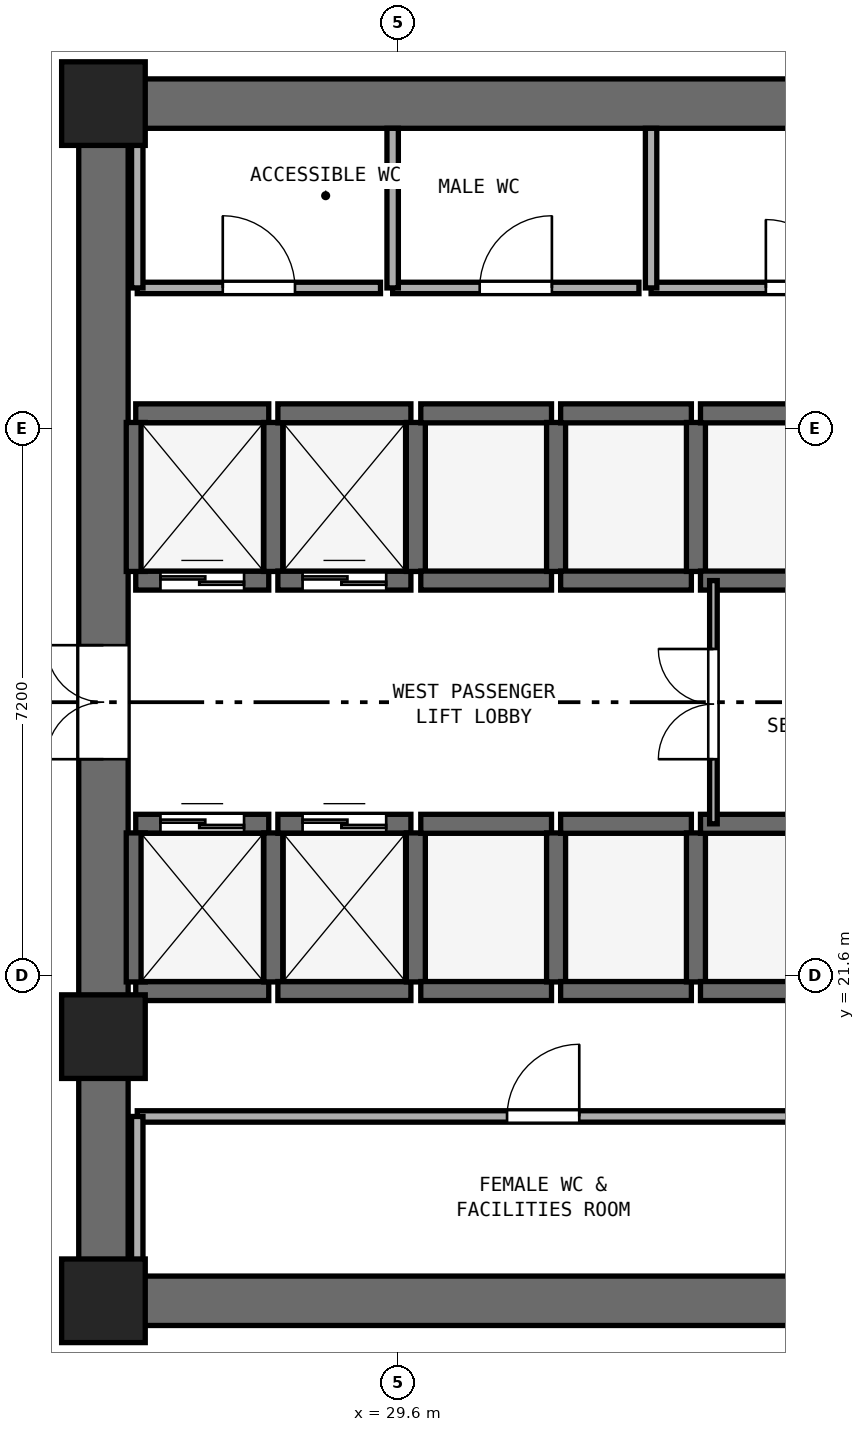
"""IFC4 building model, lengths in metres.
Left out: names, types, materials, properties, quantities, classifications, styles, units other than length and angle.
Written with IfcOpenShell. Run it as: python <this file> out.ifc"""

import sys

from ifc_helpers import new_model, si_unit, direction, frame, frame_2d, origin, origin_2d, place, context, subcontext, project, spatial, rectangle, extrude, element, fill, save


model = new_model("IFC4")
c1 = context("Model", 3, precision=1e-05, world=origin(), true_north=direction((0.0, 1.0)))
c2 = subcontext(c1, "Body", "Model", "MODEL_VIEW")
j1 = project(units=[si_unit("LENGTHUNIT", "METRE"), si_unit("PLANEANGLEUNIT", "RADIAN")], contexts=[c1])
p1 = place(None, origin())
s1 = spatial("IfcSite", under=j1, at=p1, CompositionType="ELEMENT")
p2 = place(p1, origin())
s2 = spatial("IfcBuilding", under=s1, at=p2, CompositionType="ELEMENT")
p3 = place(p2, frame((0.0, 0.0, 93.4)))
s3 = spatial("IfcBuildingStorey", under=s2, at=p3, CompositionType="ELEMENT", Elevation=93.4)
for number, where, z_axis, x_axis in (
    (1, (25.4, 17.325, 0.0), (0.0, 0.0, 1.0), (1.0, 0.0, 0.0)),
    (2, (25.4, 33.075, 0.0), (0.0, 0.0, 1.0), (1.0, 0.0, 0.0)),
):
    element("IfcWall", number, at=place(p3, frame(where, z_axis=z_axis, x_axis=x_axis)), inside=s3, PredefinedType="SHEAR", context=c2, shape_type="SweptSolid", body=[
        extrude(rectangle(XDim=23.2, YDim=0.65, at=frame_2d((11.6, 0.0))), origin(), (0.0, 0.0, 1.0), 3.525),
    ])
p4 = place(p3, frame((25.725, 17.65, 0.0), z_axis=(0.0, 0.0, 1.0), x_axis=(0.0, 1.0, 0.0)))
e3 = element("IfcWall", 3, at=p4, inside=s3, PredefinedType="SHEAR", context=c2, shape_type="SweptSolid", body=[
    extrude(rectangle(XDim=15.1, YDim=0.65, at=frame_2d((7.55, 0.0))), origin(), (0.0, 0.0, 1.0), 3.525),
])
p5 = place(p4, frame((6.8, 0.0, 0.0)))
e4 = element("IfcOpeningElement", 4, at=p5, cuts=e3, PredefinedType="OPENING", context=c2, shape_type="SweptSolid", body=[
    extrude(rectangle(XDim=1.5, YDim=2.15, at=frame_2d((0.75, 1.075))), frame((0.0, 0.335, 0.0), z_axis=(0.0, -1.0, 0.0), x_axis=(1.0, 0.0, 0.0)), (0.0, 0.0, 1.0), 0.67),
])
for number, where, z_axis, x_axis in (
    (5, (25.725, 17.325, 0.0), (0.0, 0.0, 1.0), (1.0, 0.0, 0.0)),
    (6, (25.725, 33.075, 0.0), (0.0, 0.0, 1.0), (1.0, 0.0, 0.0)),
    (7, (25.725, 20.8, 0.0), (0.0, 0.0, 1.0), (1.0, 0.0, 0.0)),
):
    element("IfcColumn", number, at=place(p3, frame(where, z_axis=z_axis, x_axis=x_axis)), inside=s3, PredefinedType="PILASTER", context=c2, shape_type="SweptSolid", body=[
        extrude(rectangle(XDim=1.1, YDim=1.1, at=origin_2d()), origin(), (0.0, 0.0, 1.0), 3.8),
    ])
p6 = place(p3, frame((26.15, 26.8, 0.0), z_axis=(0.0, 0.0, 1.0), x_axis=(1.0, 0.0, 0.0)))
e8 = element("IfcWall", 8, at=p6, inside=s3, PredefinedType="SHEAR", context=c2, shape_type="SweptSolid", body=[
    extrude(rectangle(XDim=1.75, YDim=0.25, at=frame_2d((0.875, 0.0))), origin(), (0.0, 0.0, 1.0), 3.525),
])
p7 = place(p6, frame((0.325, 0.0, 0.0)))
e9 = element("IfcOpeningElement", 9, at=p7, cuts=e8, PredefinedType="OPENING", context=c2, shape_type="SweptSolid", body=[
    extrude(rectangle(XDim=1.1, YDim=2.15, at=frame_2d((0.55, 1.075))), frame((0.0, 0.135, 0.0), z_axis=(0.0, -1.0, 0.0), x_axis=(1.0, 0.0, 0.0)), (0.0, 0.0, 1.0), 0.27),
])
p8 = place(p3, frame((26.15, 29.0, 0.0), z_axis=(0.0, 0.0, 1.0), x_axis=(1.0, 0.0, 0.0)))
e10 = element("IfcWall", 10, at=p8, inside=s3, PredefinedType="SHEAR", context=c2, shape_type="SweptSolid", body=[
    extrude(rectangle(XDim=1.75, YDim=0.25, at=frame_2d((0.875, 0.0))), origin(), (0.0, 0.0, 1.0), 3.525),
])
for number, where, z_axis, x_axis in (
    (11, (26.15, 26.92, 0.0), (0.0, 0.0, 1.0), (0.0, 1.0, 0.0)),
    (12, (27.96, 26.92, 0.0), (0.0, 0.0, 1.0), (0.0, 1.0, 0.0)),
):
    element("IfcWall", number, at=place(p3, frame(where, z_axis=z_axis, x_axis=x_axis)), inside=s3, PredefinedType="SHEAR", context=c2, shape_type="SweptSolid", body=[
        extrude(rectangle(XDim=1.96, YDim=0.25, at=frame_2d((0.98, 0.0))), origin(), (0.0, 0.0, 1.0), 3.525),
    ])
p9 = place(p3, frame((28.02, 26.8, 0.0), z_axis=(0.0, 0.0, 1.0), x_axis=(1.0, 0.0, 0.0)))
e13 = element("IfcWall", 13, at=p9, inside=s3, PredefinedType="SHEAR", context=c2, shape_type="SweptSolid", body=[
    extrude(rectangle(XDim=1.75, YDim=0.25, at=frame_2d((0.875, 0.0))), origin(), (0.0, 0.0, 1.0), 3.525),
])
p10 = place(p9, frame((0.325, 0.0, 0.0)))
e14 = element("IfcOpeningElement", 14, at=p10, cuts=e13, PredefinedType="OPENING", context=c2, shape_type="SweptSolid", body=[
    extrude(rectangle(XDim=1.1, YDim=2.15, at=frame_2d((0.55, 1.075))), frame((0.0, 0.135, 0.0), z_axis=(0.0, -1.0, 0.0), x_axis=(1.0, 0.0, 0.0)), (0.0, 0.0, 1.0), 0.27),
])
p11 = place(p3, frame((28.02, 29.0, 0.0), z_axis=(0.0, 0.0, 1.0), x_axis=(1.0, 0.0, 0.0)))
e15 = element("IfcWall", 15, at=p11, inside=s3, PredefinedType="SHEAR", context=c2, shape_type="SweptSolid", body=[
    extrude(rectangle(XDim=1.75, YDim=0.25, at=frame_2d((0.875, 0.0))), origin(), (0.0, 0.0, 1.0), 3.525),
])
p12 = place(p3, frame((29.835, 26.92, 0.0), z_axis=(0.0, 0.0, 1.0), x_axis=(0.0, 1.0, 0.0)))
e16 = element("IfcWall", 16, at=p12, inside=s3, PredefinedType="SHEAR", context=c2, shape_type="SweptSolid", body=[
    extrude(rectangle(XDim=1.96, YDim=0.25, at=frame_2d((0.98, 0.0))), origin(), (0.0, 0.0, 1.0), 3.525),
])
p13 = place(p3, frame((26.15, 21.4, 0.0), z_axis=(0.0, 0.0, 1.0), x_axis=(1.0, 0.0, 0.0)))
e17 = element("IfcWall", 17, at=p13, inside=s3, PredefinedType="SHEAR", context=c2, shape_type="SweptSolid", body=[
    extrude(rectangle(XDim=1.75, YDim=0.25, at=frame_2d((0.875, 0.0))), origin(), (0.0, 0.0, 1.0), 3.525),
])
p14 = place(p3, frame((26.15, 23.6, 0.0), z_axis=(0.0, 0.0, 1.0), x_axis=(1.0, 0.0, 0.0)))
e18 = element("IfcWall", 18, at=p14, inside=s3, PredefinedType="SHEAR", context=c2, shape_type="SweptSolid", body=[
    extrude(rectangle(XDim=1.75, YDim=0.25, at=frame_2d((0.875, 0.0))), origin(), (0.0, 0.0, 1.0), 3.525),
])
p15 = place(p14, frame((0.325, 0.0, 0.0)))
e19 = element("IfcOpeningElement", 19, at=p15, cuts=e18, PredefinedType="OPENING", context=c2, shape_type="SweptSolid", body=[
    extrude(rectangle(XDim=1.1, YDim=2.15, at=frame_2d((0.55, 1.075))), frame((0.0, 0.135, 0.0), z_axis=(0.0, -1.0, 0.0), x_axis=(1.0, 0.0, 0.0)), (0.0, 0.0, 1.0), 0.27),
])
for number, where, z_axis, x_axis in (
    (20, (26.15, 21.52, 0.0), (0.0, 0.0, 1.0), (0.0, 1.0, 0.0)),
    (21, (27.96, 21.52, 0.0), (0.0, 0.0, 1.0), (0.0, 1.0, 0.0)),
):
    element("IfcWall", number, at=place(p3, frame(where, z_axis=z_axis, x_axis=x_axis)), inside=s3, PredefinedType="SHEAR", context=c2, shape_type="SweptSolid", body=[
        extrude(rectangle(XDim=1.96, YDim=0.25, at=frame_2d((0.98, 0.0))), origin(), (0.0, 0.0, 1.0), 3.525),
    ])
p16 = place(p3, frame((28.02, 21.4, 0.0), z_axis=(0.0, 0.0, 1.0), x_axis=(1.0, 0.0, 0.0)))
e22 = element("IfcWall", 22, at=p16, inside=s3, PredefinedType="SHEAR", context=c2, shape_type="SweptSolid", body=[
    extrude(rectangle(XDim=1.75, YDim=0.25, at=frame_2d((0.875, 0.0))), origin(), (0.0, 0.0, 1.0), 3.525),
])
p17 = place(p3, frame((28.02, 23.6, 0.0), z_axis=(0.0, 0.0, 1.0), x_axis=(1.0, 0.0, 0.0)))
e23 = element("IfcWall", 23, at=p17, inside=s3, PredefinedType="SHEAR", context=c2, shape_type="SweptSolid", body=[
    extrude(rectangle(XDim=1.75, YDim=0.25, at=frame_2d((0.875, 0.0))), origin(), (0.0, 0.0, 1.0), 3.525),
])
p18 = place(p17, frame((0.325, 0.0, 0.0)))
e24 = element("IfcOpeningElement", 24, at=p18, cuts=e23, PredefinedType="OPENING", context=c2, shape_type="SweptSolid", body=[
    extrude(rectangle(XDim=1.1, YDim=2.15, at=frame_2d((0.55, 1.075))), frame((0.0, 0.135, 0.0), z_axis=(0.0, -1.0, 0.0), x_axis=(1.0, 0.0, 0.0)), (0.0, 0.0, 1.0), 0.27),
])
p19 = place(p3, frame((29.835, 21.52, 0.0), z_axis=(0.0, 0.0, 1.0), x_axis=(0.0, 1.0, 0.0)))
e25 = element("IfcWall", 25, at=p19, inside=s3, PredefinedType="SHEAR", context=c2, shape_type="SweptSolid", body=[
    extrude(rectangle(XDim=1.96, YDim=0.25, at=frame_2d((0.98, 0.0))), origin(), (0.0, 0.0, 1.0), 3.525),
])
for number, where, z_axis, x_axis in (
    (26, (29.9, 21.4, 0.0), (0.0, 0.0, 1.0), (1.0, 0.0, 0.0)),
    (27, (29.9, 23.6, 0.0), (0.0, 0.0, 1.0), (1.0, 0.0, 0.0)),
):
    element("IfcWall", number, at=place(p3, frame(where, z_axis=z_axis, x_axis=x_axis)), inside=s3, PredefinedType="SHEAR", context=c2, shape_type="SweptSolid", body=[
        extrude(rectangle(XDim=1.72, YDim=0.25, at=frame_2d((0.86, 0.0))), origin(), (0.0, 0.0, 1.0), 3.525),
    ])
p20 = place(p3, frame((31.68, 21.52, 0.0), z_axis=(0.0, 0.0, 1.0), x_axis=(0.0, 1.0, 0.0)))
e28 = element("IfcWall", 28, at=p20, inside=s3, PredefinedType="SHEAR", context=c2, shape_type="SweptSolid", body=[
    extrude(rectangle(XDim=1.96, YDim=0.25, at=frame_2d((0.98, 0.0))), origin(), (0.0, 0.0, 1.0), 3.525),
])
for number, where, z_axis, x_axis in (
    (29, (31.74, 21.4, 0.0), (0.0, 0.0, 1.0), (1.0, 0.0, 0.0)),
    (30, (31.74, 23.6, 0.0), (0.0, 0.0, 1.0), (1.0, 0.0, 0.0)),
):
    element("IfcWall", number, at=place(p3, frame(where, z_axis=z_axis, x_axis=x_axis)), inside=s3, PredefinedType="SHEAR", context=c2, shape_type="SweptSolid", body=[
        extrude(rectangle(XDim=1.72, YDim=0.25, at=frame_2d((0.86, 0.0))), origin(), (0.0, 0.0, 1.0), 3.525),
    ])
p21 = place(p3, frame((33.52, 21.52, 0.0), z_axis=(0.0, 0.0, 1.0), x_axis=(0.0, 1.0, 0.0)))
e31 = element("IfcWall", 31, at=p21, inside=s3, PredefinedType="SHEAR", context=c2, shape_type="SweptSolid", body=[
    extrude(rectangle(XDim=1.96, YDim=0.25, at=frame_2d((0.98, 0.0))), origin(), (0.0, 0.0, 1.0), 3.525),
])
for number, where, z_axis, x_axis in (
    (32, (33.58, 21.4, 0.0), (0.0, 0.0, 1.0), (1.0, 0.0, 0.0)),
    (33, (33.58, 23.6, 0.0), (0.0, 0.0, 1.0), (1.0, 0.0, 0.0)),
):
    element("IfcWall", number, at=place(p3, frame(where, z_axis=z_axis, x_axis=x_axis)), inside=s3, PredefinedType="SHEAR", context=c2, shape_type="SweptSolid", body=[
        extrude(rectangle(XDim=1.72, YDim=0.25, at=frame_2d((0.86, 0.0))), origin(), (0.0, 0.0, 1.0), 3.525),
    ])
for number, where, z_axis, x_axis in (
    (34, (29.9, 26.8, 0.0), (0.0, 0.0, 1.0), (1.0, 0.0, 0.0)),
    (35, (29.9, 29.0, 0.0), (0.0, 0.0, 1.0), (1.0, 0.0, 0.0)),
):
    element("IfcWall", number, at=place(p3, frame(where, z_axis=z_axis, x_axis=x_axis)), inside=s3, PredefinedType="SHEAR", context=c2, shape_type="SweptSolid", body=[
        extrude(rectangle(XDim=1.72, YDim=0.25, at=frame_2d((0.86, 0.0))), origin(), (0.0, 0.0, 1.0), 3.525),
    ])
p22 = place(p3, frame((31.68, 26.92, 0.0), z_axis=(0.0, 0.0, 1.0), x_axis=(0.0, 1.0, 0.0)))
e36 = element("IfcWall", 36, at=p22, inside=s3, PredefinedType="SHEAR", context=c2, shape_type="SweptSolid", body=[
    extrude(rectangle(XDim=1.96, YDim=0.25, at=frame_2d((0.98, 0.0))), origin(), (0.0, 0.0, 1.0), 3.525),
])
for number, where, z_axis, x_axis in (
    (37, (31.74, 26.8, 0.0), (0.0, 0.0, 1.0), (1.0, 0.0, 0.0)),
    (38, (31.74, 29.0, 0.0), (0.0, 0.0, 1.0), (1.0, 0.0, 0.0)),
):
    element("IfcWall", number, at=place(p3, frame(where, z_axis=z_axis, x_axis=x_axis)), inside=s3, PredefinedType="SHEAR", context=c2, shape_type="SweptSolid", body=[
        extrude(rectangle(XDim=1.72, YDim=0.25, at=frame_2d((0.86, 0.0))), origin(), (0.0, 0.0, 1.0), 3.525),
    ])
p23 = place(p3, frame((33.52, 26.92, 0.0), z_axis=(0.0, 0.0, 1.0), x_axis=(0.0, 1.0, 0.0)))
e39 = element("IfcWall", 39, at=p23, inside=s3, PredefinedType="SHEAR", context=c2, shape_type="SweptSolid", body=[
    extrude(rectangle(XDim=1.96, YDim=0.25, at=frame_2d((0.98, 0.0))), origin(), (0.0, 0.0, 1.0), 3.525),
])
for number, where, z_axis, x_axis in (
    (40, (33.58, 26.8, 0.0), (0.0, 0.0, 1.0), (1.0, 0.0, 0.0)),
    (41, (33.58, 29.0, 0.0), (0.0, 0.0, 1.0), (1.0, 0.0, 0.0)),
):
    element("IfcWall", number, at=place(p3, frame(where, z_axis=z_axis, x_axis=x_axis)), inside=s3, PredefinedType="SHEAR", context=c2, shape_type="SweptSolid", body=[
        extrude(rectangle(XDim=1.72, YDim=0.25, at=frame_2d((0.86, 0.0))), origin(), (0.0, 0.0, 1.0), 3.525),
    ])
p24 = place(p3, frame((26.17, 30.65, 0.0), z_axis=(0.0, 0.0, 1.0), x_axis=(1.0, 0.0, 0.0)))
e42 = element("IfcWall", 42, at=p24, inside=s3, PredefinedType="PARTITIONING", context=c2, shape_type="SweptSolid", body=[
    extrude(rectangle(XDim=3.2, YDim=0.15, at=frame_2d((1.6, 0.0))), origin(), (0.0, 0.0, 1.0), 3.525),
])
p25 = place(p24, frame((1.125, 0.0, 0.0)))
e43 = element("IfcOpeningElement", 43, at=p25, cuts=e42, PredefinedType="OPENING", context=c2, shape_type="SweptSolid", body=[
    extrude(rectangle(XDim=0.95, YDim=2.1, at=frame_2d((0.475, 1.05))), frame((0.0, 0.085, 0.0), z_axis=(0.0, -1.0, 0.0), x_axis=(1.0, 0.0, 0.0)), (0.0, 0.0, 1.0), 0.17),
])
p26 = place(p3, frame((26.17, 30.65, 0.0), z_axis=(0.0, 0.0, 1.0), x_axis=(0.0, 1.0, 0.0)))
e44 = element("IfcWall", 44, at=p26, inside=s3, PredefinedType="PARTITIONING", context=c2, shape_type="SweptSolid", body=[
    extrude(rectangle(XDim=2.1, YDim=0.15, at=frame_2d((1.05, 0.0))), origin(), (0.0, 0.0, 1.0), 3.525),
])
p27 = place(p3, frame((29.53, 30.65, 0.0), z_axis=(0.0, 0.0, 1.0), x_axis=(1.0, 0.0, 0.0)))
e45 = element("IfcWall", 45, at=p27, inside=s3, PredefinedType="PARTITIONING", context=c2, shape_type="SweptSolid", body=[
    extrude(rectangle(XDim=3.24, YDim=0.15, at=frame_2d((1.62, 0.0))), origin(), (0.0, 0.0, 1.0), 3.525),
])
p28 = place(p27, frame((1.145, 0.0, 0.0)))
e46 = element("IfcOpeningElement", 46, at=p28, cuts=e45, PredefinedType="OPENING", context=c2, shape_type="SweptSolid", body=[
    extrude(rectangle(XDim=0.95, YDim=2.1, at=frame_2d((0.475, 1.05))), frame((0.0, 0.085, 0.0), z_axis=(0.0, -1.0, 0.0), x_axis=(1.0, 0.0, 0.0)), (0.0, 0.0, 1.0), 0.17),
])
p29 = place(p3, frame((29.53, 30.65, 0.0), z_axis=(0.0, 0.0, 1.0), x_axis=(0.0, 1.0, 0.0)))
e47 = element("IfcWall", 47, at=p29, inside=s3, PredefinedType="PARTITIONING", context=c2, shape_type="SweptSolid", body=[
    extrude(rectangle(XDim=2.1, YDim=0.15, at=frame_2d((1.05, 0.0))), origin(), (0.0, 0.0, 1.0), 3.525),
])
p30 = place(p3, frame((32.93, 30.65, 0.0), z_axis=(0.0, 0.0, 1.0), x_axis=(1.0, 0.0, 0.0)))
e48 = element("IfcWall", 48, at=p30, inside=s3, PredefinedType="PARTITIONING", context=c2, shape_type="SweptSolid", body=[
    extrude(rectangle(XDim=3.92, YDim=0.15, at=frame_2d((1.96, 0.0))), origin(), (0.0, 0.0, 1.0), 3.525),
])
p31 = place(p30, frame((1.51, 0.0, 0.0)))
e49 = element("IfcOpeningElement", 49, at=p31, cuts=e48, PredefinedType="OPENING", context=c2, shape_type="SweptSolid", body=[
    extrude(rectangle(XDim=0.9, YDim=2.1, at=frame_2d((0.45, 1.05))), frame((0.0, 0.085, 0.0), z_axis=(0.0, -1.0, 0.0), x_axis=(1.0, 0.0, 0.0)), (0.0, 0.0, 1.0), 0.17),
])
p32 = place(p3, frame((32.93, 30.65, 0.0), z_axis=(0.0, 0.0, 1.0), x_axis=(0.0, 1.0, 0.0)))
e50 = element("IfcWall", 50, at=p32, inside=s3, PredefinedType="PARTITIONING", context=c2, shape_type="SweptSolid", body=[
    extrude(rectangle(XDim=2.1, YDim=0.15, at=frame_2d((1.05, 0.0))), origin(), (0.0, 0.0, 1.0), 3.525),
])
p33 = place(p3, frame((26.17, 19.75, 0.0), z_axis=(0.0, 0.0, 1.0), x_axis=(1.0, 0.0, 0.0)))
e51 = element("IfcWall", 51, at=p33, inside=s3, PredefinedType="PARTITIONING", context=c2, shape_type="SweptSolid", body=[
    extrude(rectangle(XDim=10.68, YDim=0.15, at=frame_2d((5.34, 0.0))), origin(), (0.0, 0.0, 1.0), 3.525),
])
p34 = place(p33, frame((4.865, 0.0, 0.0)))
e52 = element("IfcOpeningElement", 52, at=p34, cuts=e51, PredefinedType="OPENING", context=c2, shape_type="SweptSolid", body=[
    extrude(rectangle(XDim=0.95, YDim=2.1, at=frame_2d((0.475, 1.05))), frame((0.0, 0.085, 0.0), z_axis=(0.0, -1.0, 0.0), x_axis=(1.0, 0.0, 0.0)), (0.0, 0.0, 1.0), 0.17),
])
p35 = place(p3, frame((26.17, 17.65, 0.0), z_axis=(0.0, 0.0, 1.0), x_axis=(0.0, 1.0, 0.0)))
e53 = element("IfcWall", 53, at=p35, inside=s3, PredefinedType="PARTITIONING", context=c2, shape_type="SweptSolid", body=[
    extrude(rectangle(XDim=2.1, YDim=0.15, at=frame_2d((1.05, 0.0))), origin(), (0.0, 0.0, 1.0), 3.525),
])
p36 = place(p3, frame((33.75, 23.6, 0.0), z_axis=(0.0, 0.0, 1.0), x_axis=(0.0, 1.0, 0.0)))
e54 = element("IfcWall", 54, at=p36, inside=s3, PredefinedType="PARTITIONING", context=c2, shape_type="SweptSolid", body=[
    extrude(rectangle(XDim=3.2, YDim=0.1, at=frame_2d((1.6, 0.0))), origin(), (0.0, 0.0, 1.0), 3.525),
])
p37 = place(p36, frame((0.85, 0.0, 0.0)))
e55 = element("IfcOpeningElement", 55, at=p37, cuts=e54, PredefinedType="OPENING", context=c2, shape_type="SweptSolid", body=[
    extrude(rectangle(XDim=1.45, YDim=2.12, at=frame_2d((0.725, 1.06))), frame((0.0, 0.06, 0.0), z_axis=(0.0, -1.0, 0.0), x_axis=(1.0, 0.0, 0.0)), (0.0, 0.0, 1.0), 0.12),
])
p38 = place(p7, origin())
e56 = element("IfcDoor", 56, at=p38, inside=s3, OperationType="DOUBLE_DOOR_SLIDING", PredefinedType="DOOR", context=c2, shape_type="SweptSolid", body=[
    extrude(rectangle(XDim=1.1, YDim=2.15, at=frame_2d((0.55, 1.075))), frame((0.0, 0.025, 0.0), z_axis=(0.0, -1.0, 0.0), x_axis=(1.0, 0.0, 0.0)), (0.0, 0.0, 1.0), 0.05),
])
fill(e9, e56)
p39 = place(p10, origin())
e57 = element("IfcDoor", 57, at=p39, inside=s3, OperationType="DOUBLE_DOOR_SLIDING", PredefinedType="DOOR", context=c2, shape_type="SweptSolid", body=[
    extrude(rectangle(XDim=1.1, YDim=2.15, at=frame_2d((0.55, 1.075))), frame((0.0, 0.025, 0.0), z_axis=(0.0, -1.0, 0.0), x_axis=(1.0, 0.0, 0.0)), (0.0, 0.0, 1.0), 0.05),
])
fill(e14, e57)
p40 = place(p15, origin())
e58 = element("IfcDoor", 58, at=p40, inside=s3, OperationType="DOUBLE_DOOR_SLIDING", PredefinedType="DOOR", context=c2, shape_type="SweptSolid", body=[
    extrude(rectangle(XDim=1.1, YDim=2.15, at=frame_2d((0.55, 1.075))), frame((0.0, 0.025, 0.0), z_axis=(0.0, -1.0, 0.0), x_axis=(1.0, 0.0, 0.0)), (0.0, 0.0, 1.0), 0.05),
])
fill(e19, e58)
p41 = place(p18, origin())
e59 = element("IfcDoor", 59, at=p41, inside=s3, OperationType="DOUBLE_DOOR_SLIDING", PredefinedType="DOOR", context=c2, shape_type="SweptSolid", body=[
    extrude(rectangle(XDim=1.1, YDim=2.15, at=frame_2d((0.55, 1.075))), frame((0.0, 0.025, 0.0), z_axis=(0.0, -1.0, 0.0), x_axis=(1.0, 0.0, 0.0)), (0.0, 0.0, 1.0), 0.05),
])
fill(e24, e59)
p42 = place(p5, origin())
e60 = element("IfcDoor", 60, at=p42, inside=s3, OperationType="DOUBLE_DOOR_SINGLE_SWING", PredefinedType="DOOR", context=c2, shape_type="SweptSolid", body=[
    extrude(rectangle(XDim=1.5, YDim=2.15, at=frame_2d((0.75, 1.075))), frame((0.0, 0.025, 0.0), z_axis=(0.0, -1.0, 0.0), x_axis=(1.0, 0.0, 0.0)), (0.0, 0.0, 1.0), 0.05),
])
fill(e4, e60)
p43 = place(p25, origin())
e61 = element("IfcDoor", 61, at=p43, inside=s3, OperationType="SINGLE_SWING_LEFT", PredefinedType="DOOR", context=c2, shape_type="SweptSolid", body=[
    extrude(rectangle(XDim=0.95, YDim=2.1, at=frame_2d((0.475, 1.05))), frame((0.0, 0.025, 0.0), z_axis=(0.0, -1.0, 0.0), x_axis=(1.0, 0.0, 0.0)), (0.0, 0.0, 1.0), 0.05),
])
fill(e43, e61)
p44 = place(p28, origin())
e62 = element("IfcDoor", 62, at=p44, inside=s3, OperationType="SINGLE_SWING_RIGHT", PredefinedType="DOOR", context=c2, shape_type="SweptSolid", body=[
    extrude(rectangle(XDim=0.95, YDim=2.1, at=frame_2d((0.475, 1.05))), frame((0.0, 0.025, 0.0), z_axis=(0.0, -1.0, 0.0), x_axis=(1.0, 0.0, 0.0)), (0.0, 0.0, 1.0), 0.05),
])
fill(e46, e62)
p45 = place(p31, origin())
e63 = element("IfcDoor", 63, at=p45, inside=s3, OperationType="SINGLE_SWING_LEFT", PredefinedType="DOOR", context=c2, shape_type="SweptSolid", body=[
    extrude(rectangle(XDim=0.9, YDim=2.1, at=frame_2d((0.45, 1.05))), frame((0.0, 0.025, 0.0), z_axis=(0.0, -1.0, 0.0), x_axis=(1.0, 0.0, 0.0)), (0.0, 0.0, 1.0), 0.05),
])
fill(e49, e63)
p46 = place(p34, origin())
e64 = element("IfcDoor", 64, at=p46, inside=s3, OperationType="SINGLE_SWING_RIGHT", PredefinedType="DOOR", context=c2, shape_type="SweptSolid", body=[
    extrude(rectangle(XDim=0.95, YDim=2.1, at=frame_2d((0.475, 1.05))), frame((0.0, 0.025, 0.0), z_axis=(0.0, -1.0, 0.0), x_axis=(1.0, 0.0, 0.0)), (0.0, 0.0, 1.0), 0.05),
])
fill(e52, e64)
p47 = place(p37, origin())
e65 = element("IfcDoor", 65, at=p47, inside=s3, OperationType="DOUBLE_DOOR_SINGLE_SWING", PredefinedType="DOOR", context=c2, shape_type="SweptSolid", body=[
    extrude(rectangle(XDim=1.45, YDim=2.12, at=frame_2d((0.725, 1.06))), frame((0.0, 0.025, 0.0), z_axis=(0.0, -1.0, 0.0), x_axis=(1.0, 0.0, 0.0)), (0.0, 0.0, 1.0), 0.05),
])
fill(e55, e65)
save(model, sys.argv[1])
